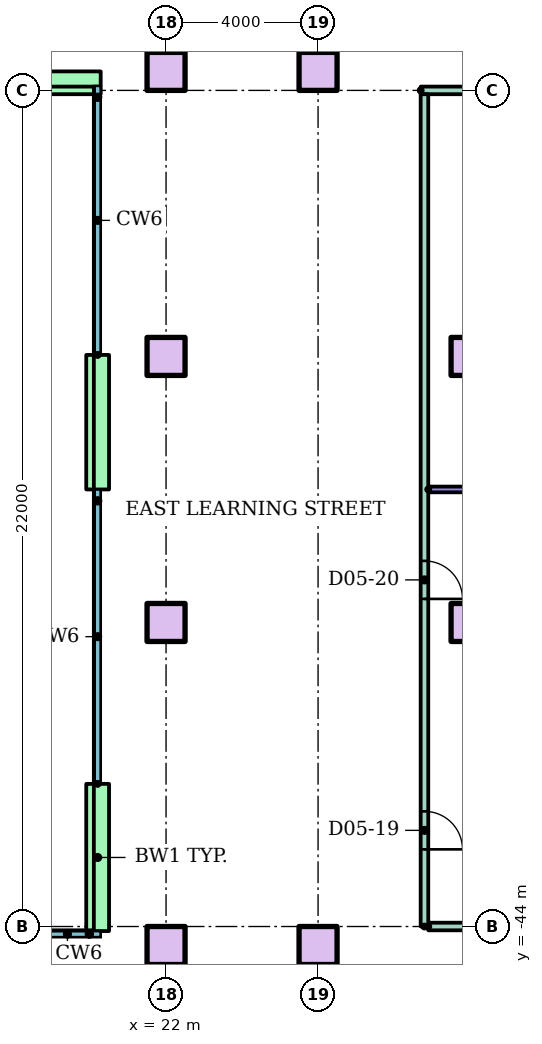
"""IFC4 building model, lengths in metres.
Left out: names, types, materials, properties, quantities, classifications, styles, units other than length and angle.
Written with IfcOpenShell. Run it as: python <this file> out.ifc"""

import sys

from ifc_helpers import new_model, si_unit, direction, frame, frame_2d, origin, origin_2d, place, context, subcontext, project, spatial, rectangle, extrude, element, fill, save


model = new_model("IFC4")
c1 = context("Model", 3, precision=1e-05, world=origin(), true_north=direction((0.0, 1.0)))
c2 = subcontext(c1, "Body", "Model", "MODEL_VIEW")
j1 = project(units=[si_unit("LENGTHUNIT", "METRE"), si_unit("PLANEANGLEUNIT", "RADIAN")], contexts=[c1])
p1 = place(None, origin())
s1 = spatial("IfcSite", under=j1, at=p1, CompositionType="ELEMENT")
p2 = place(p1, origin())
s2 = spatial("IfcBuilding", under=s1, at=p2, CompositionType="ELEMENT")
p3 = place(p2, frame((0.0, 0.0, 22.0)))
s3 = spatial("IfcBuildingStorey", under=s2, at=p3, CompositionType="ELEMENT", Elevation=22.0)
for number, where in (
    (1, (22.0, -44.5, 0.0)),
    (2, (26.0, -44.5, 0.0)),
    (3, (22.0, -36.0, 0.0)),
    (4, (30.0, -36.0, 0.0)),
    (5, (22.0, -29.0, 0.0)),
    (6, (30.0, -29.0, 0.0)),
    (7, (22.0, -21.5, 0.0)),
    (8, (26.0, -21.5, 0.0)),
):
    element("IfcColumn", number, at=place(p3, frame(where)), inside=s3, PredefinedType="COLUMN", context=c2, shape_type="SweptSolid", body=[
        extrude(rectangle(XDim=1.0, YDim=1.0, at=origin_2d()), origin(), (0.0, 0.0, 1.0), 3.7),
    ])
p4 = place(p3, frame((18.53, -21.8, 0.0)))
e9 = element("IfcWall", 9, at=p4, inside=s3, PredefinedType="STANDARD", context=c2, shape_type="SweptSolid", body=[
    extrude(rectangle(XDim=1.75, YDim=0.6, at=frame_2d((0.875, 0.0))), origin(), (0.0, 0.0, 1.0), 3.7),
])
p5 = place(p3, frame((20.2, -28.96, 0.0), z_axis=(0.0, 0.0, 1.0), x_axis=(0.0, -1.0, 0.0)))
e10 = element("IfcWall", 10, at=p5, inside=s3, PredefinedType="STANDARD", context=c2, shape_type="SweptSolid", body=[
    extrude(rectangle(XDim=3.54, YDim=0.6, at=frame_2d((1.77, 0.0))), origin(), (0.0, 0.0, 1.0), 3.7),
])
p6 = place(p3, frame((20.2, -40.247, 0.0), z_axis=(0.0, 0.0, 1.0), x_axis=(0.0, -1.0, 0.0)))
e11 = element("IfcWall", 11, at=p6, inside=s3, PredefinedType="STANDARD", context=c2, shape_type="SweptSolid", body=[
    extrude(rectangle(XDim=3.874, YDim=0.6, at=frame_2d((1.937, 0.0))), origin(), (0.0, 0.0, 1.0), 3.7),
])
p7 = place(p3, frame((28.9, -44.0, 0.0)))
e12 = element("IfcWall", 12, at=p7, inside=s3, PredefinedType="PARTITIONING", context=c2, shape_type="SweptSolid", body=[
    extrude(rectangle(XDim=4.6, YDim=0.2, at=frame_2d((2.3, 0.0))), origin(), (0.0, 0.0, 1.0), 3.2),
])
p8 = place(p3, frame((28.9, -32.5, 0.0)))
e13 = element("IfcWall", 13, at=p8, inside=s3, PredefinedType="PARTITIONING", context=c2, shape_type="SweptSolid", body=[
    extrude(rectangle(XDim=10.7, YDim=0.15, at=frame_2d((5.35, 0.0))), origin(), (0.0, 0.0, 1.0), 3.2),
])
p9 = place(p3, frame((28.7, -22.0, 0.0)))
e14 = element("IfcWall", 14, at=p9, inside=s3, PredefinedType="PARTITIONING", context=c2, shape_type="SweptSolid", body=[
    extrude(rectangle(XDim=4.8, YDim=0.2, at=frame_2d((2.4, 0.0))), origin(), (0.0, 0.0, 1.0), 3.2),
])
p10 = place(p9, frame((2.064, 0.0, 0.0)))
e15 = element("IfcOpeningElement", 15, at=p10, cuts=e14, PredefinedType="OPENING", context=c2, shape_type="SweptSolid", body=[
    extrude(rectangle(XDim=1.0, YDim=2.1, at=frame_2d((0.5, 1.05))), frame((0.0, 0.11, 0.0), z_axis=(0.0, -1.0, 0.0), x_axis=(1.0, 0.0, 0.0)), (0.0, 0.0, 1.0), 0.22),
])
p11 = place(p9, frame((3.45, 0.0, 0.0)))
e16 = element("IfcOpeningElement", 16, at=p11, cuts=e14, PredefinedType="OPENING", context=c2, shape_type="SweptSolid", body=[
    extrude(rectangle(XDim=1.0, YDim=2.1, at=frame_2d((0.5, 1.05))), frame((0.0, 0.11, 0.0), z_axis=(0.0, -1.0, 0.0), x_axis=(1.0, 0.0, 0.0)), (0.0, 0.0, 1.0), 0.22),
])
p12 = place(p3, frame((28.8, -44.0, 0.0), z_axis=(0.0, 0.0, 1.0), x_axis=(0.0, 1.0, 0.0)))
e17 = element("IfcWall", 17, at=p12, inside=s3, PredefinedType="PARTITIONING", context=c2, shape_type="SweptSolid", body=[
    extrude(rectangle(XDim=21.9, YDim=0.2, at=frame_2d((10.95, 0.0))), origin(), (0.0, 0.0, 1.0), 3.2),
])
p13 = place(p12, frame((2.03, 0.0, 0.0)))
e18 = element("IfcOpeningElement", 18, at=p13, cuts=e17, PredefinedType="OPENING", context=c2, shape_type="SweptSolid", body=[
    extrude(rectangle(XDim=1.0, YDim=2.1, at=frame_2d((0.5, 1.05))), frame((0.0, 0.11, 0.0), z_axis=(0.0, -1.0, 0.0), x_axis=(1.0, 0.0, 0.0)), (0.0, 0.0, 1.0), 0.22),
])
p14 = place(p12, frame((8.62, 0.0, 0.0)))
e19 = element("IfcOpeningElement", 19, at=p14, cuts=e17, PredefinedType="OPENING", context=c2, shape_type="SweptSolid", body=[
    extrude(rectangle(XDim=1.0, YDim=2.1, at=frame_2d((0.5, 1.05))), frame((0.0, 0.11, 0.0), z_axis=(0.0, -1.0, 0.0), x_axis=(1.0, 0.0, 0.0)), (0.0, 0.0, 1.0), 0.22),
])
p15 = place(p13, frame((1.0, 0.0, 0.0), z_axis=(0.0, 0.0, 1.0), x_axis=(-1.0, 0.0, 0.0)))
e20 = element("IfcDoor", 20, at=p15, inside=s3, OperationType="SINGLE_SWING_LEFT", PredefinedType="DOOR", context=c2, shape_type="SweptSolid", body=[
    extrude(rectangle(XDim=1.0, YDim=2.1, at=frame_2d((0.5, 1.05))), frame((0.0, 0.025, 0.0), z_axis=(0.0, -1.0, 0.0), x_axis=(1.0, 0.0, 0.0)), (0.0, 0.0, 1.0), 0.05),
])
fill(e18, e20)
p16 = place(p14, frame((1.0, 0.0, 0.0), z_axis=(0.0, 0.0, 1.0), x_axis=(-1.0, 0.0, 0.0)))
e21 = element("IfcDoor", 21, at=p16, inside=s3, OperationType="SINGLE_SWING_LEFT", PredefinedType="DOOR", context=c2, shape_type="SweptSolid", body=[
    extrude(rectangle(XDim=1.0, YDim=2.1, at=frame_2d((0.5, 1.05))), frame((0.0, 0.025, 0.0), z_axis=(0.0, -1.0, 0.0), x_axis=(1.0, 0.0, 0.0)), (0.0, 0.0, 1.0), 0.05),
])
fill(e19, e21)
save(model, sys.argv[1])
